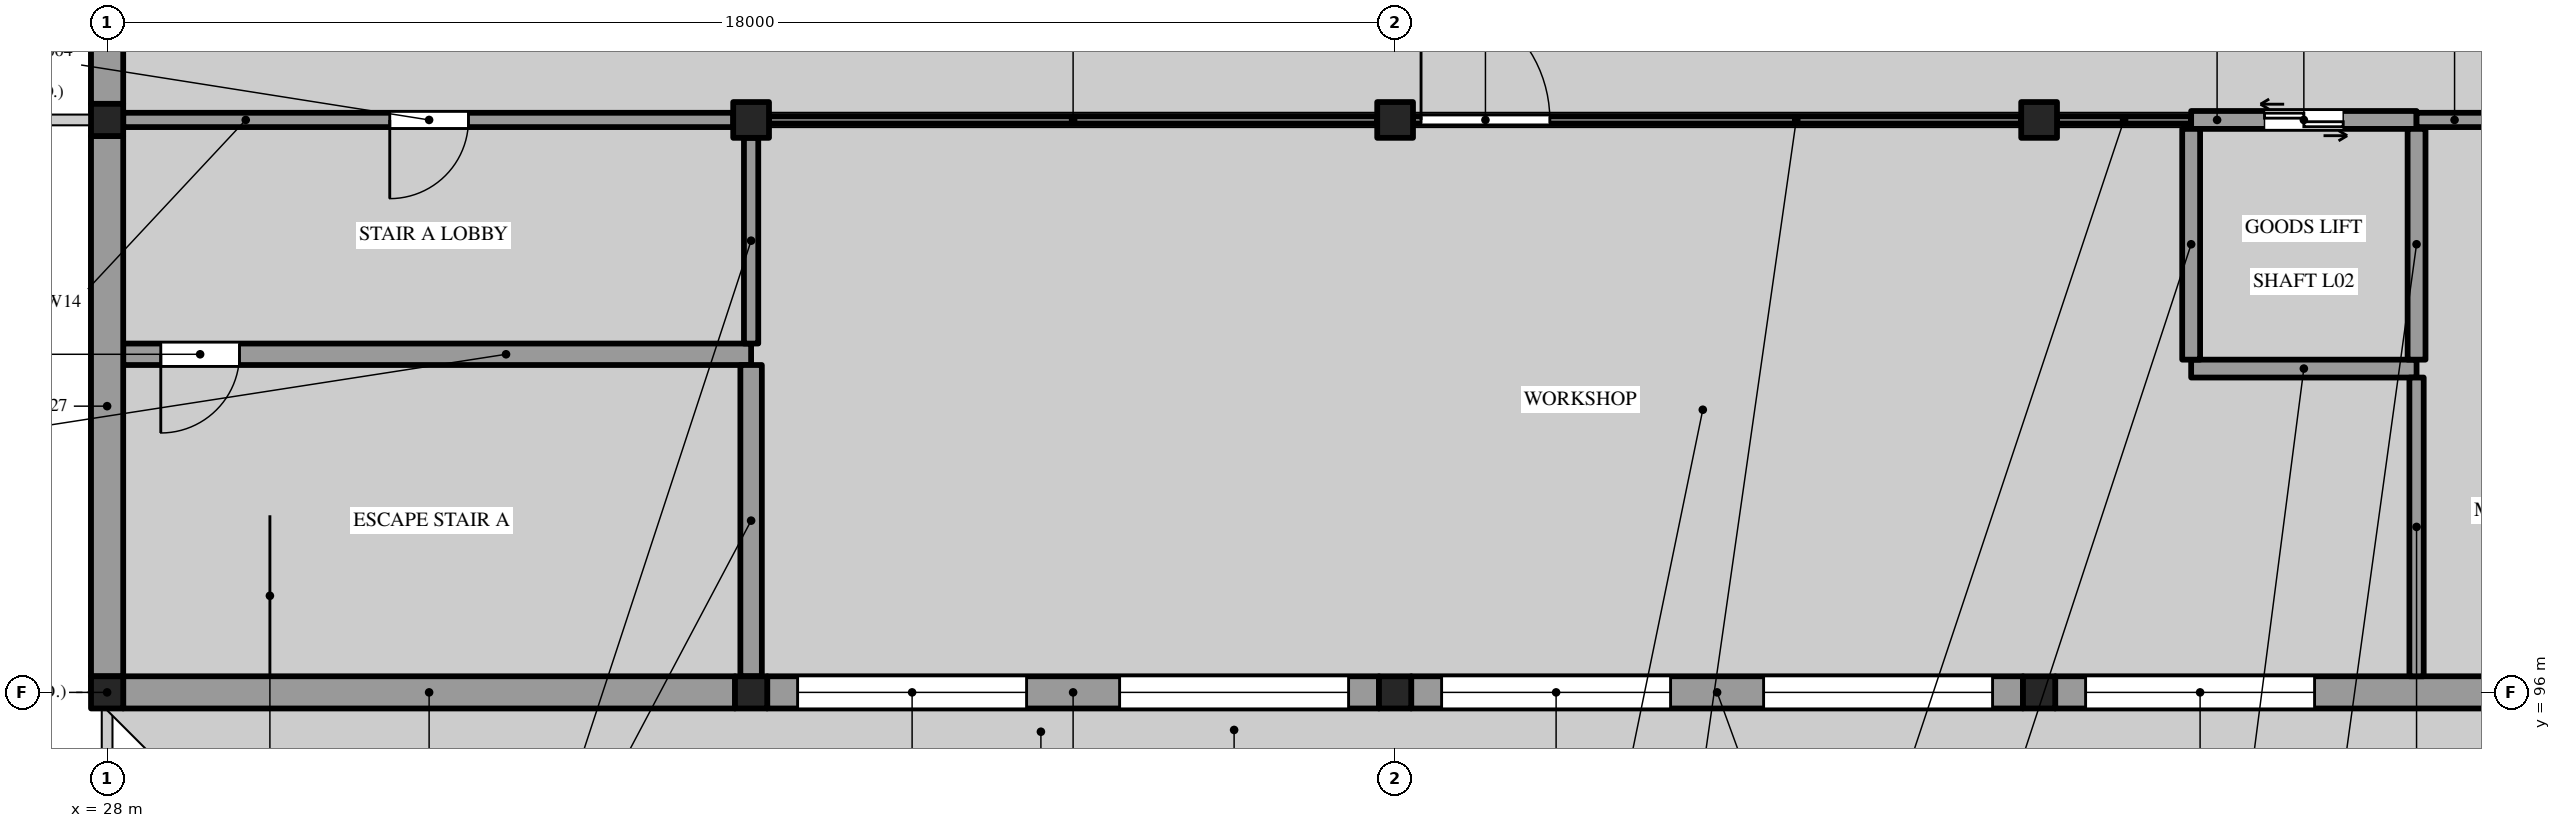
"""IFC4 building model, lengths in metres.
Left out: names, types, materials, properties, quantities, classifications, styles, units other than length and angle.
Written with IfcOpenShell. Run it as: python <this file> out.ifc"""

import sys

from ifc_helpers import new_model, si_unit, direction, frame, frame_2d, origin, origin_2d, place, context, subcontext, project, spatial, polyline, rectangle, outline, extrude, element, fill, save


model = new_model("IFC4")
c1 = context("Model", 3, precision=1e-05, world=origin(), true_north=direction((0.0, 1.0)))
c2 = subcontext(c1, "Body", "Model", "MODEL_VIEW")
j1 = project(units=[si_unit("LENGTHUNIT", "METRE"), si_unit("PLANEANGLEUNIT", "RADIAN")], contexts=[c1])
p1 = place(None, origin())
s1 = spatial("IfcSite", under=j1, at=p1, CompositionType="ELEMENT")
p2 = place(p1, origin())
s2 = spatial("IfcBuilding", under=s1, at=p2, CompositionType="ELEMENT")
p3 = place(p2, frame((0.0, 0.0, 12.0)))
s3 = spatial("IfcBuildingStorey", under=s2, at=p3, CompositionType="ELEMENT", Elevation=12.0)
p4 = place(p3, frame((28.0, 96.0, 0.0), z_axis=(0.0, 0.0, 1.0), x_axis=(1.0, 0.0, 0.0)))
e1 = element("IfcColumn", 1, at=p4, inside=s3, PredefinedType="COLUMN", context=c2, shape_type="SweptSolid", body=[
    extrude(rectangle(XDim=0.45, YDim=0.45, at=origin_2d()), origin(), (0.0, 0.0, 1.0), 4.838),
])
p5 = place(p3, frame((28.0, 104.0, 0.0), z_axis=(0.0, 0.0, 1.0), x_axis=(1.0, 0.0, 0.0)))
e2 = element("IfcColumn", 2, at=p5, inside=s3, PredefinedType="COLUMN", context=c2, shape_type="SweptSolid", body=[
    extrude(rectangle(XDim=0.45, YDim=0.45, at=origin_2d()), origin(), (0.0, 0.0, 1.0), 7.072),
])
p6 = place(p3, frame((37.0, 96.0, 0.0), z_axis=(0.0, 0.0, 1.0), x_axis=(1.0, 0.0, 0.0)))
e3 = element("IfcColumn", 3, at=p6, inside=s3, PredefinedType="COLUMN", context=c2, shape_type="SweptSolid", body=[
    extrude(rectangle(XDim=0.45, YDim=0.45, at=origin_2d()), origin(), (0.0, 0.0, 1.0), 4.838),
])
p7 = place(p3, frame((37.0, 104.0, 0.0), z_axis=(0.0, 0.0, 1.0), x_axis=(1.0, 0.0, 0.0)))
e4 = element("IfcColumn", 4, at=p7, inside=s3, PredefinedType="COLUMN", context=c2, shape_type="SweptSolid", body=[
    extrude(rectangle(XDim=0.5, YDim=0.5, at=origin_2d()), origin(), (0.0, 0.0, 1.0), 7.072),
])
p8 = place(p3, frame((46.0, 96.0, 0.0), z_axis=(0.0, 0.0, 1.0), x_axis=(1.0, 0.0, 0.0)))
e5 = element("IfcColumn", 5, at=p8, inside=s3, PredefinedType="COLUMN", context=c2, shape_type="SweptSolid", body=[
    extrude(rectangle(XDim=0.45, YDim=0.45, at=origin_2d()), origin(), (0.0, 0.0, 1.0), 4.838),
])
p9 = place(p3, frame((46.0, 104.0, 0.0), z_axis=(0.0, 0.0, 1.0), x_axis=(1.0, 0.0, 0.0)))
e6 = element("IfcColumn", 6, at=p9, inside=s3, PredefinedType="COLUMN", context=c2, shape_type="SweptSolid", body=[
    extrude(rectangle(XDim=0.5, YDim=0.5, at=origin_2d()), origin(), (0.0, 0.0, 1.0), 7.072),
])
p10 = place(p3, frame((55.0, 96.0, 0.0), z_axis=(0.0, 0.0, 1.0), x_axis=(1.0, 0.0, 0.0)))
e7 = element("IfcColumn", 7, at=p10, inside=s3, PredefinedType="COLUMN", context=c2, shape_type="SweptSolid", body=[
    extrude(rectangle(XDim=0.45, YDim=0.45, at=origin_2d()), origin(), (0.0, 0.0, 1.0), 4.838),
])
p11 = place(p3, frame((55.0, 104.0, 0.0), z_axis=(0.0, 0.0, 1.0), x_axis=(1.0, 0.0, 0.0)))
e8 = element("IfcColumn", 8, at=p11, inside=s3, PredefinedType="COLUMN", context=c2, shape_type="SweptSolid", body=[
    extrude(rectangle(XDim=0.5, YDim=0.5, at=origin_2d()), origin(), (0.0, 0.0, 1.0), 7.072),
])
p12 = place(p3, frame((28.225, 96.0, 0.0), z_axis=(0.0, 0.0, 1.0), x_axis=(1.0, 0.0, 0.0)))
e9 = element("IfcWall", 9, at=p12, inside=s3, PredefinedType="SOLIDWALL", context=c2, shape_type="SweptSolid", body=[
    extrude(rectangle(XDim=8.55, YDim=0.45, at=frame_2d((4.275, 0.0))), origin(), (0.0, 0.0, 1.0), 4.688),
])
p13 = place(p3, frame((37.225, 96.0, 0.0), z_axis=(0.0, 0.0, 1.0), x_axis=(1.0, 0.0, 0.0)))
e10 = element("IfcWall", 10, at=p13, inside=s3, PredefinedType="SOLIDWALL", context=c2, shape_type="SweptSolid", body=[
    extrude(rectangle(XDim=8.55, YDim=0.45, at=frame_2d((4.275, 0.0))), origin(), (0.0, 0.0, 1.0), 4.688),
])
p14 = place(p13, frame((0.425, 0.0, 1.1)))
e11 = element("IfcOpeningElement", 11, at=p14, cuts=e10, PredefinedType="OPENING", context=c2, shape_type="SweptSolid", body=[
    extrude(rectangle(XDim=3.2, YDim=1.5, at=frame_2d((1.6, 0.75))), frame((0.0, 0.235, 0.0), z_axis=(0.0, -1.0, 0.0), x_axis=(1.0, 0.0, 0.0)), (0.0, 0.0, 1.0), 0.47),
])
p15 = place(p13, frame((4.925, 0.0, 1.1)))
e12 = element("IfcOpeningElement", 12, at=p15, cuts=e10, PredefinedType="OPENING", context=c2, shape_type="SweptSolid", body=[
    extrude(rectangle(XDim=3.2, YDim=1.5, at=frame_2d((1.6, 0.75))), frame((0.0, 0.235, 0.0), z_axis=(0.0, -1.0, 0.0), x_axis=(1.0, 0.0, 0.0)), (0.0, 0.0, 1.0), 0.47),
])
p16 = place(p3, frame((46.225, 96.0, 0.0), z_axis=(0.0, 0.0, 1.0), x_axis=(1.0, 0.0, 0.0)))
e13 = element("IfcWall", 13, at=p16, inside=s3, PredefinedType="SOLIDWALL", context=c2, shape_type="SweptSolid", body=[
    extrude(rectangle(XDim=8.55, YDim=0.45, at=frame_2d((4.275, 0.0))), origin(), (0.0, 0.0, 1.0), 4.688),
])
p17 = place(p16, frame((0.425, 0.0, 1.1)))
e14 = element("IfcOpeningElement", 14, at=p17, cuts=e13, PredefinedType="OPENING", context=c2, shape_type="SweptSolid", body=[
    extrude(rectangle(XDim=3.2, YDim=1.5, at=frame_2d((1.6, 0.75))), frame((0.0, 0.235, 0.0), z_axis=(0.0, -1.0, 0.0), x_axis=(1.0, 0.0, 0.0)), (0.0, 0.0, 1.0), 0.47),
])
p18 = place(p16, frame((4.925, 0.0, 1.1)))
e15 = element("IfcOpeningElement", 15, at=p18, cuts=e13, PredefinedType="OPENING", context=c2, shape_type="SweptSolid", body=[
    extrude(rectangle(XDim=3.2, YDim=1.5, at=frame_2d((1.6, 0.75))), frame((0.0, 0.235, 0.0), z_axis=(0.0, -1.0, 0.0), x_axis=(1.0, 0.0, 0.0)), (0.0, 0.0, 1.0), 0.47),
])
p19 = place(p3, frame((55.225, 96.0, 0.0), z_axis=(0.0, 0.0, 1.0), x_axis=(1.0, 0.0, 0.0)))
e16 = element("IfcWall", 16, at=p19, inside=s3, PredefinedType="SOLIDWALL", context=c2, shape_type="SweptSolid", body=[
    extrude(rectangle(XDim=8.55, YDim=0.45, at=frame_2d((4.275, 0.0))), origin(), (0.0, 0.0, 1.0), 4.688),
])
p20 = place(p19, frame((0.425, 0.0, 1.1)))
e17 = element("IfcOpeningElement", 17, at=p20, cuts=e16, PredefinedType="OPENING", context=c2, shape_type="SweptSolid", body=[
    extrude(rectangle(XDim=3.2, YDim=1.5, at=frame_2d((1.6, 0.75))), frame((0.0, 0.235, 0.0), z_axis=(0.0, -1.0, 0.0), x_axis=(1.0, 0.0, 0.0)), (0.0, 0.0, 1.0), 0.47),
])
p21 = place(p3, frame((57.125, 100.525, 0.0), z_axis=(0.0, 0.0, 1.0), x_axis=(1.0, 0.0, 0.0)))
e18 = element("IfcWall", 18, at=p21, inside=s3, PredefinedType="SOLIDWALL", context=c2, shape_type="SweptSolid", body=[
    extrude(rectangle(XDim=3.15, YDim=0.25, at=frame_2d((1.575, 0.0))), origin(), (0.0, 0.0, 1.0), 5.985),
])
p22 = place(p3, frame((28.225, 100.725, 0.0), z_axis=(0.0, 0.0, 1.0), x_axis=(1.0, 0.0, 0.0)))
e19 = element("IfcWall", 19, at=p22, inside=s3, PredefinedType="SHEAR", context=c2, shape_type="SweptSolid", body=[
    extrude(rectangle(XDim=8.775, YDim=0.3, at=frame_2d((4.387, 0.0))), origin(), (0.0, 0.0, 1.0), 6.043),
])
p23 = place(p22, frame((0.525, 0.0, 0.0)))
e20 = element("IfcOpeningElement", 20, at=p23, cuts=e19, PredefinedType="OPENING", context=c2, shape_type="SweptSolid", body=[
    extrude(rectangle(XDim=1.1, YDim=2.1, at=frame_2d((0.55, 1.05))), frame((0.0, 0.16, 0.0), z_axis=(0.0, -1.0, 0.0), x_axis=(1.0, 0.0, 0.0)), (0.0, 0.0, 1.0), 0.32),
])
p24 = place(p3, frame((28.225, 104.0, 0.0), z_axis=(0.0, 0.0, 1.0), x_axis=(1.0, 0.0, 0.0)))
e21 = element("IfcWall", 21, at=p24, inside=s3, PredefinedType="SOLIDWALL", context=c2, shape_type="SweptSolid", body=[
    extrude(rectangle(XDim=8.525, YDim=0.2, at=frame_2d((4.262, 0.0))), origin(), (0.0, 0.0, 1.0), 6.922),
])
p25 = place(p24, frame((3.725, 0.0, 0.0)))
e22 = element("IfcOpeningElement", 22, at=p25, cuts=e21, PredefinedType="OPENING", context=c2, shape_type="SweptSolid", body=[
    extrude(rectangle(XDim=1.1, YDim=2.1, at=frame_2d((0.55, 1.05))), frame((0.0, 0.11, 0.0), z_axis=(0.0, -1.0, 0.0), x_axis=(1.0, 0.0, 0.0)), (0.0, 0.0, 1.0), 0.22),
])
p26 = place(p3, frame((37.25, 104.0, 0.0), z_axis=(0.0, 0.0, 1.0), x_axis=(1.0, 0.0, 0.0)))
e23 = element("IfcWall", 23, at=p26, inside=s3, PredefinedType="PARTITIONING", context=c2, shape_type="SweptSolid", body=[
    extrude(rectangle(XDim=8.5, YDim=0.1, at=frame_2d((4.25, 0.0))), origin(), (0.0, 0.0, 1.0), 6.922),
])
p27 = place(p3, frame((46.25, 104.0, 0.0), z_axis=(0.0, 0.0, 1.0), x_axis=(1.0, 0.0, 0.0)))
e24 = element("IfcWall", 24, at=p27, inside=s3, PredefinedType="PARTITIONING", context=c2, shape_type="SweptSolid", body=[
    extrude(rectangle(XDim=8.5, YDim=0.1, at=frame_2d((4.25, 0.0))), origin(), (0.0, 0.0, 1.0), 6.922),
])
p28 = place(p27, frame((0.113, 0.0, 0.0)))
e25 = element("IfcOpeningElement", 25, at=p28, cuts=e24, PredefinedType="OPENING", context=c2, shape_type="SweptSolid", body=[
    extrude(rectangle(XDim=1.8, YDim=2.1, at=frame_2d((0.9, 1.05))), frame((0.0, 0.06, 0.0), z_axis=(0.0, -1.0, 0.0), x_axis=(1.0, 0.0, 0.0)), (0.0, 0.0, 1.0), 0.12),
])
p29 = place(p3, frame((55.25, 104.0, 0.0), z_axis=(0.0, 0.0, 1.0), x_axis=(1.0, 0.0, 0.0)))
e26 = element("IfcWall", 26, at=p29, inside=s3, PredefinedType="PARTITIONING", context=c2, shape_type="SweptSolid", body=[
    extrude(rectangle(XDim=1.875, YDim=0.1, at=frame_2d((0.938, 0.0))), origin(), (0.0, 0.0, 1.0), 6.922),
])
p30 = place(p3, frame((57.125, 104.0, 0.0), z_axis=(0.0, 0.0, 1.0), x_axis=(1.0, 0.0, 0.0)))
e27 = element("IfcWall", 27, at=p30, inside=s3, PredefinedType="SOLIDWALL", context=c2, shape_type="SweptSolid", body=[
    extrude(rectangle(XDim=3.15, YDim=0.25, at=frame_2d((1.575, 0.0))), origin(), (0.0, 0.0, 1.0), 6.922),
])
p31 = place(p30, frame((1.025, 0.0, 0.0)))
e28 = element("IfcOpeningElement", 28, at=p31, cuts=e27, PredefinedType="OPENING", context=c2, shape_type="SweptSolid", body=[
    extrude(rectangle(XDim=1.1, YDim=2.1, at=frame_2d((0.55, 1.05))), frame((0.0, 0.135, 0.0), z_axis=(0.0, -1.0, 0.0), x_axis=(1.0, 0.0, 0.0)), (0.0, 0.0, 1.0), 0.27),
])
p32 = place(p3, frame((60.275, 104.0, 0.0), z_axis=(0.0, 0.0, 1.0), x_axis=(1.0, 0.0, 0.0)))
e29 = element("IfcWall", 29, at=p32, inside=s3, PredefinedType="SOLIDWALL", context=c2, shape_type="SweptSolid", body=[
    extrude(rectangle(XDim=3.475, YDim=0.2, at=frame_2d((1.738, 0.0))), origin(), (0.0, 0.0, 1.0), 6.922),
])
p33 = place(p32, frame((1.363, 0.0, 0.0)))
e30 = element("IfcOpeningElement", 30, at=p33, cuts=e29, PredefinedType="OPENING", context=c2, shape_type="SweptSolid", body=[
    extrude(rectangle(XDim=1.0, YDim=2.1, at=frame_2d((0.5, 1.05))), frame((0.0, 0.11, 0.0), z_axis=(0.0, -1.0, 0.0), x_axis=(1.0, 0.0, 0.0)), (0.0, 0.0, 1.0), 0.22),
])
p34 = place(p3, frame((28.0, 103.775, 0.0), z_axis=(0.0, 0.0, 1.0), x_axis=(0.0, -1.0, 0.0)))
e31 = element("IfcWall", 31, at=p34, inside=s3, PredefinedType="SOLIDWALL", context=c2, shape_type="SweptSolid", body=[
    extrude(outline(polyline([(0.0, 0.0), (7.55, 0.0), (7.55, 4.752), (0.0, 6.917), (0.0, 0.0)])), frame((0.0, 0.225, 0.0), z_axis=(0.0, -1.0, 0.0), x_axis=(1.0, 0.0, 0.0)), (0.0, 0.0, 1.0), 0.45),
])
p35 = place(p3, frame((28.0, 111.775, 0.0), z_axis=(0.0, 0.0, 1.0), x_axis=(0.0, -1.0, 0.0)))
e32 = element("IfcWall", 32, at=p35, inside=s3, PredefinedType="SOLIDWALL", context=c2, shape_type="SweptSolid", body=[
    extrude(outline(polyline([(0.0, 0.0), (7.55, 0.0), (7.55, 6.917), (0.0, 4.752), (0.0, 0.0)])), frame((0.0, 0.225, 0.0), z_axis=(0.0, -1.0, 0.0), x_axis=(1.0, 0.0, 0.0)), (0.0, 0.0, 1.0), 0.45),
])
p36 = place(p3, frame((37.0, 96.225, 0.0), z_axis=(0.0, 0.0, 1.0), x_axis=(0.0, 1.0, 0.0)))
e33 = element("IfcWall", 33, at=p36, inside=s3, PredefinedType="SHEAR", context=c2, shape_type="SweptSolid", body=[
    extrude(outline(polyline([(0.0, 0.0), (4.35, 0.0), (4.35, 6.0), (0.0, 4.752), (0.0, 0.0)])), frame((0.0, 0.15, 0.0), z_axis=(0.0, -1.0, 0.0), x_axis=(1.0, 0.0, 0.0)), (0.0, 0.0, 1.0), 0.3),
])
p37 = place(p3, frame((37.0, 100.875, 0.0), z_axis=(0.0, 0.0, 1.0), x_axis=(0.0, 1.0, 0.0)))
e34 = element("IfcWall", 34, at=p37, inside=s3, PredefinedType="SOLIDWALL", context=c2, shape_type="SweptSolid", body=[
    extrude(outline(polyline([(0.0, 0.0), (2.875, 0.0), (2.875, 6.91), (0.0, 6.086), (0.0, 0.0)])), frame((0.0, 0.1, 0.0), z_axis=(0.0, -1.0, 0.0), x_axis=(1.0, 0.0, 0.0)), (0.0, 0.0, 1.0), 0.2),
])
p38 = place(p3, frame((57.125, 100.65, 0.0), z_axis=(0.0, 0.0, 1.0), x_axis=(0.0, 1.0, 0.0)))
e35 = element("IfcWall", 35, at=p38, inside=s3, PredefinedType="SOLIDWALL", context=c2, shape_type="SweptSolid", body=[
    extrude(outline(polyline([(0.0, 0.0), (3.225, 0.0), (3.225, 6.946), (0.0, 6.021), (0.0, 0.0)])), frame((0.0, 0.125, 0.0), z_axis=(0.0, -1.0, 0.0), x_axis=(1.0, 0.0, 0.0)), (0.0, 0.0, 1.0), 0.25),
])
p39 = place(p3, frame((60.275, 96.225, 0.0), z_axis=(0.0, 0.0, 1.0), x_axis=(0.0, 1.0, 0.0)))
e36 = element("IfcWall", 36, at=p39, inside=s3, PredefinedType="SOLIDWALL", context=c2, shape_type="SweptSolid", body=[
    extrude(outline(polyline([(0.0, 0.0), (4.175, 0.0), (4.175, 5.95), (0.0, 4.752), (0.0, 0.0)])), frame((0.0, 0.1, 0.0), z_axis=(0.0, -1.0, 0.0), x_axis=(1.0, 0.0, 0.0)), (0.0, 0.0, 1.0), 0.2),
])
p40 = place(p3, frame((60.275, 100.65, 0.0), z_axis=(0.0, 0.0, 1.0), x_axis=(0.0, 1.0, 0.0)))
e37 = element("IfcWall", 37, at=p40, inside=s3, PredefinedType="SOLIDWALL", context=c2, shape_type="SweptSolid", body=[
    extrude(outline(polyline([(0.0, 0.0), (3.225, 0.0), (3.225, 6.946), (0.0, 6.021), (0.0, 0.0)])), frame((0.0, 0.125, 0.0), z_axis=(0.0, -1.0, 0.0), x_axis=(1.0, 0.0, 0.0)), (0.0, 0.0, 1.0), 0.25),
])
p41 = place(p25, frame((1.1, 0.0, 0.0), z_axis=(0.0, 0.0, 1.0), x_axis=(-1.0, 0.0, 0.0)))
e38 = element("IfcDoor", 38, at=p41, inside=s3, OperationType="SINGLE_SWING_RIGHT", PredefinedType="DOOR", context=c2, shape_type="SweptSolid", body=[
    extrude(rectangle(XDim=1.1, YDim=2.1, at=frame_2d((0.55, 1.05))), frame((0.0, 0.025, 0.0), z_axis=(0.0, -1.0, 0.0), x_axis=(1.0, 0.0, 0.0)), (0.0, 0.0, 1.0), 0.05),
])
fill(e22, e38)
p42 = place(p23, frame((1.1, 0.0, 0.0), z_axis=(0.0, 0.0, 1.0), x_axis=(-1.0, 0.0, 0.0)))
e39 = element("IfcDoor", 39, at=p42, inside=s3, OperationType="SINGLE_SWING_LEFT", PredefinedType="DOOR", context=c2, shape_type="SweptSolid", body=[
    extrude(rectangle(XDim=1.1, YDim=2.1, at=frame_2d((0.55, 1.05))), frame((0.0, 0.025, 0.0), z_axis=(0.0, -1.0, 0.0), x_axis=(1.0, 0.0, 0.0)), (0.0, 0.0, 1.0), 0.05),
])
fill(e20, e39)
p43 = place(p28, origin())
e40 = element("IfcDoor", 40, at=p43, inside=s3, OperationType="DOUBLE_DOOR_SINGLE_SWING", PredefinedType="DOOR", context=c2, shape_type="SweptSolid", body=[
    extrude(rectangle(XDim=1.8, YDim=2.1, at=frame_2d((0.9, 1.05))), frame((0.0, 0.025, 0.0), z_axis=(0.0, -1.0, 0.0), x_axis=(1.0, 0.0, 0.0)), (0.0, 0.0, 1.0), 0.05),
])
fill(e25, e40)
p44 = place(p31, origin())
e41 = element("IfcDoor", 41, at=p44, inside=s3, OperationType="DOUBLE_DOOR_SLIDING", PredefinedType="DOOR", context=c2, shape_type="SweptSolid", body=[
    extrude(rectangle(XDim=1.1, YDim=2.1, at=frame_2d((0.55, 1.05))), frame((0.0, 0.025, 0.0), z_axis=(0.0, -1.0, 0.0), x_axis=(1.0, 0.0, 0.0)), (0.0, 0.0, 1.0), 0.05),
])
fill(e28, e41)
p45 = place(p14, origin())
e42 = element("IfcWindow", 42, at=p45, inside=s3, PartitioningType="SINGLE_PANEL", PredefinedType="WINDOW", context=c2, shape_type="SweptSolid", body=[
    extrude(rectangle(XDim=3.2, YDim=1.5, at=frame_2d((1.6, 0.75))), frame((0.0, 0.215, 0.0), z_axis=(0.0, -1.0, 0.0), x_axis=(1.0, 0.0, 0.0)), (0.0, 0.0, 1.0), 0.06),
])
fill(e11, e42)
p46 = place(p15, origin())
e43 = element("IfcWindow", 43, at=p46, inside=s3, PartitioningType="SINGLE_PANEL", PredefinedType="WINDOW", context=c2, shape_type="SweptSolid", body=[
    extrude(rectangle(XDim=3.2, YDim=1.5, at=frame_2d((1.6, 0.75))), frame((0.0, 0.215, 0.0), z_axis=(0.0, -1.0, 0.0), x_axis=(1.0, 0.0, 0.0)), (0.0, 0.0, 1.0), 0.06),
])
fill(e12, e43)
p47 = place(p17, origin())
e44 = element("IfcWindow", 44, at=p47, inside=s3, PartitioningType="SINGLE_PANEL", PredefinedType="WINDOW", context=c2, shape_type="SweptSolid", body=[
    extrude(rectangle(XDim=3.2, YDim=1.5, at=frame_2d((1.6, 0.75))), frame((0.0, 0.215, 0.0), z_axis=(0.0, -1.0, 0.0), x_axis=(1.0, 0.0, 0.0)), (0.0, 0.0, 1.0), 0.06),
])
fill(e14, e44)
p48 = place(p18, origin())
e45 = element("IfcWindow", 45, at=p48, inside=s3, PartitioningType="SINGLE_PANEL", PredefinedType="WINDOW", context=c2, shape_type="SweptSolid", body=[
    extrude(rectangle(XDim=3.2, YDim=1.5, at=frame_2d((1.6, 0.75))), frame((0.0, 0.215, 0.0), z_axis=(0.0, -1.0, 0.0), x_axis=(1.0, 0.0, 0.0)), (0.0, 0.0, 1.0), 0.06),
])
fill(e15, e45)
p49 = place(p20, origin())
e46 = element("IfcWindow", 46, at=p49, inside=s3, PartitioningType="SINGLE_PANEL", PredefinedType="WINDOW", context=c2, shape_type="SweptSolid", body=[
    extrude(rectangle(XDim=3.2, YDim=1.5, at=frame_2d((1.6, 0.75))), frame((0.0, 0.215, 0.0), z_axis=(0.0, -1.0, 0.0), x_axis=(1.0, 0.0, 0.0)), (0.0, 0.0, 1.0), 0.06),
])
fill(e17, e46)
save(model, sys.argv[1])
